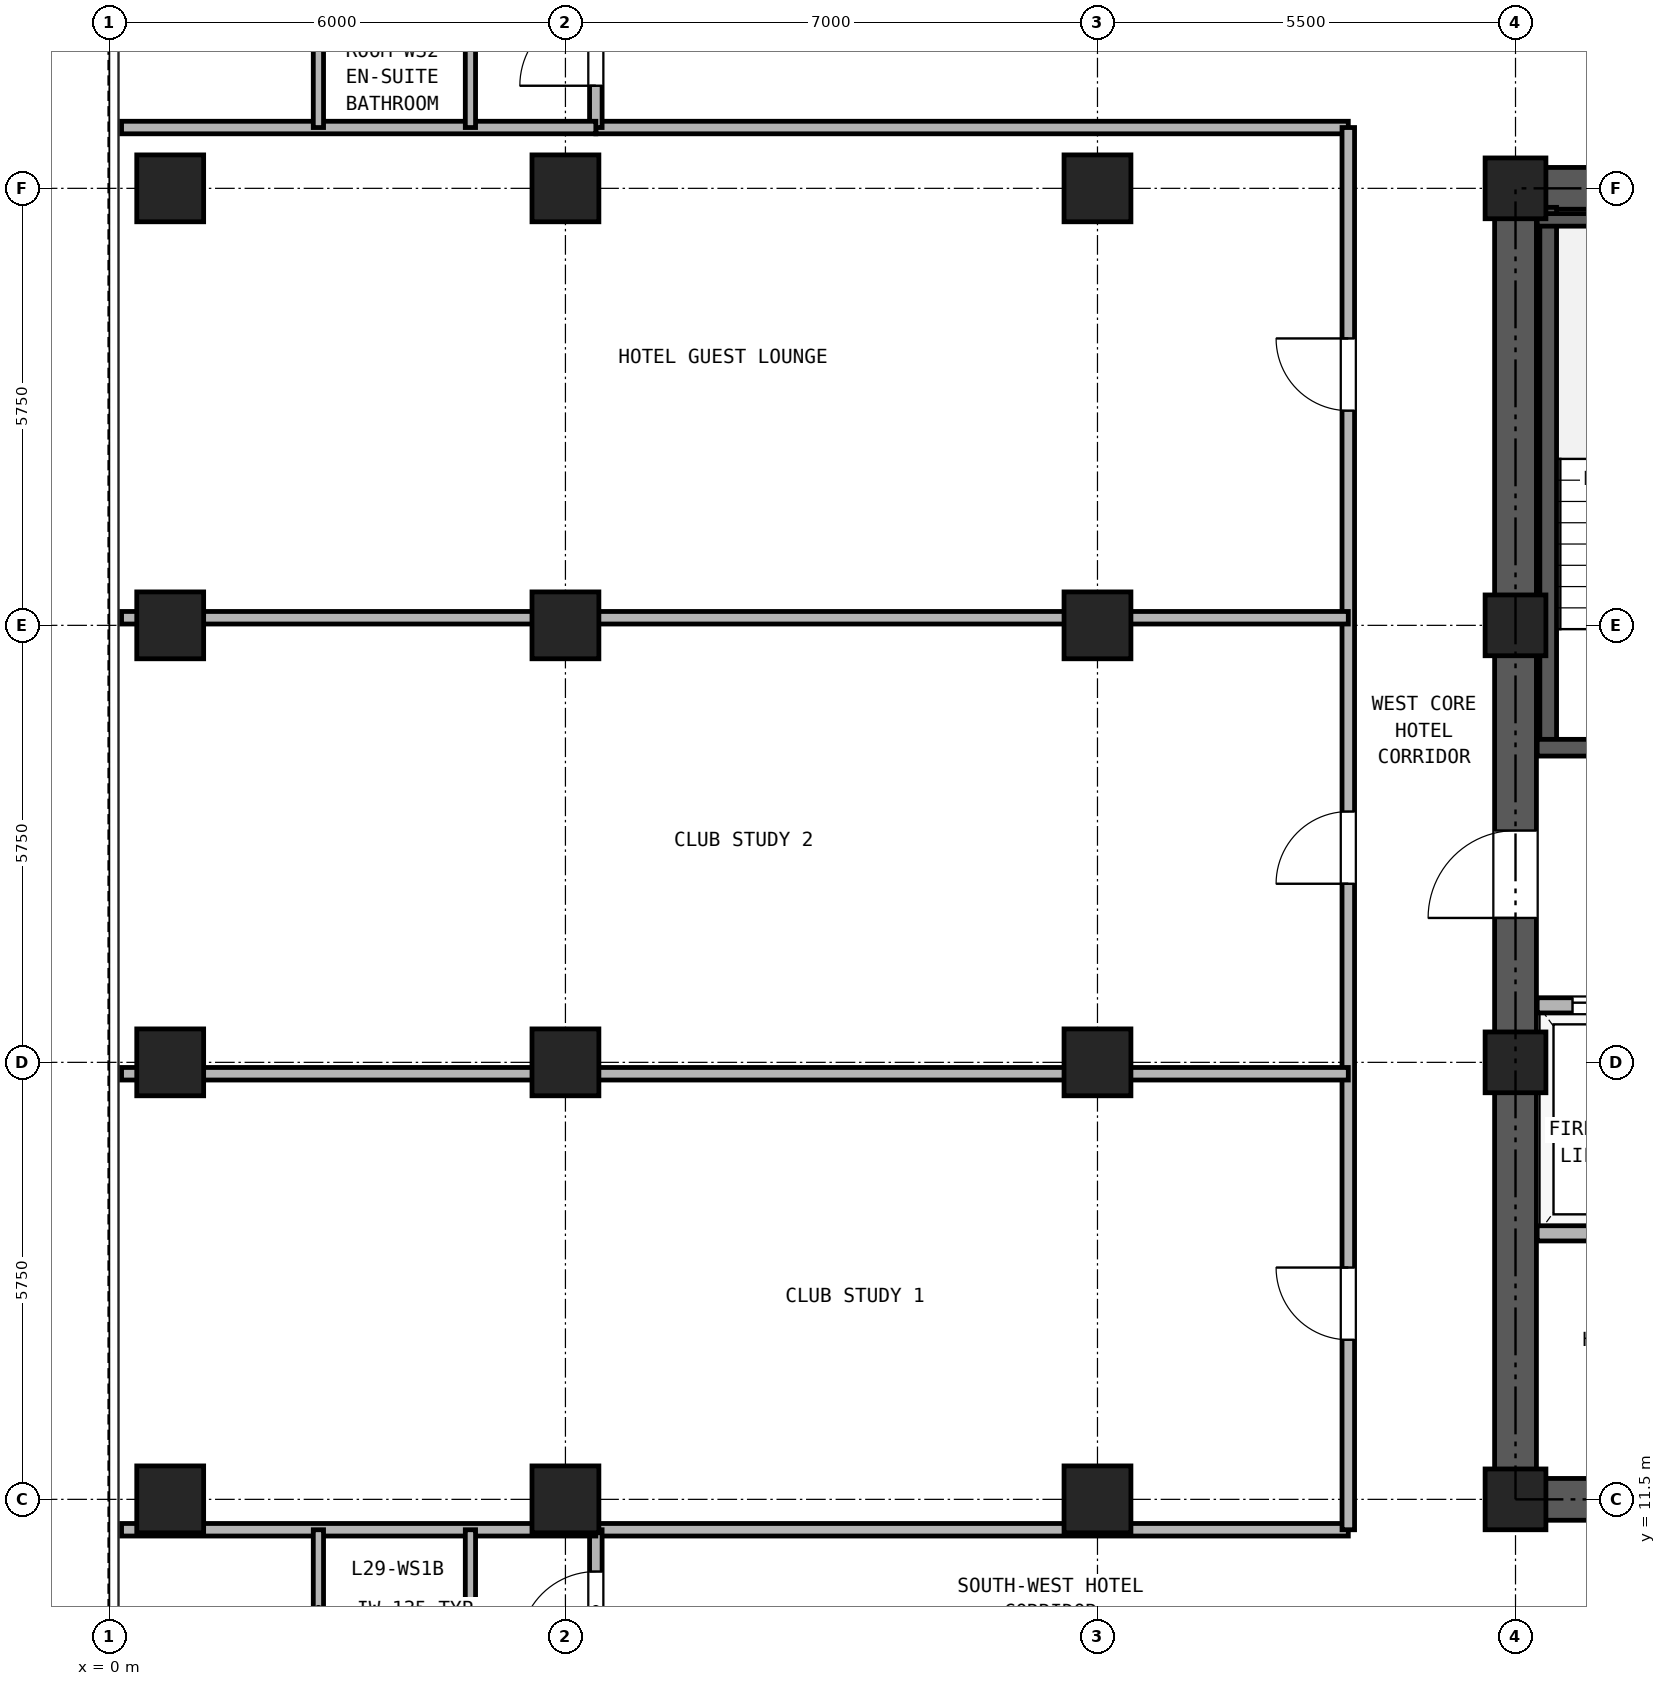
"""IFC4 building model, lengths in metres.
Left out: names, types, materials, properties, quantities, classifications, styles, units other than length and angle.
Written with IfcOpenShell. Run it as: python <this file> out.ifc"""

import sys

from ifc_helpers import new_model, si_unit, direction, frame, frame_2d, origin, origin_2d, place, context, subcontext, project, spatial, rectangle, hollow_rectangle, extrude, source, transform, mapped, element, fill, save


model = new_model("IFC4")
c1 = context("Model", 3, precision=1e-05, world=origin(), true_north=direction((0.0, 1.0)))
c2 = subcontext(c1, "Body", "Model", "MODEL_VIEW")
j1 = project(units=[si_unit("LENGTHUNIT", "METRE"), si_unit("PLANEANGLEUNIT", "RADIAN")], contexts=[c1])
p1 = place(None, origin())
s1 = spatial("IfcSite", under=j1, at=p1, CompositionType="ELEMENT")
p2 = place(p1, origin())
s2 = spatial("IfcBuilding", under=s1, at=p2, CompositionType="ELEMENT")
p3 = place(p2, frame((0.0, 0.0, 108.7)))
s3 = spatial("IfcBuildingStorey", under=s2, at=p3, CompositionType="ELEMENT", Elevation=108.7)
m1 = source(origin(), c2, "Body", "SweptSolid", [
    extrude(hollow_rectangle(XDim=0.88, YDim=0.88, WallThickness=0.05, at=origin_2d()), origin(), (0.0, 0.0, 1.0), 2.95),
])
for number, where, z_axis, x_axis in (
    (1, (0.8, 11.5, 0.0), (0.0, 0.0, 1.0), (1.0, 0.0, 0.0)),
    (2, (0.8, 17.25, 0.0), (0.0, 0.0, 1.0), (1.0, 0.0, 0.0)),
    (3, (0.8, 23.0, 0.0), (0.0, 0.0, 1.0), (1.0, 0.0, 0.0)),
    (4, (0.8, 28.75, 0.0), (0.0, 0.0, 1.0), (1.0, 0.0, 0.0)),
    (5, (6.0, 11.5, 0.0), (0.0, 0.0, 1.0), (1.0, 0.0, 0.0)),
    (6, (6.0, 17.25, 0.0), (0.0, 0.0, 1.0), (1.0, 0.0, 0.0)),
    (7, (6.0, 23.0, 0.0), (0.0, 0.0, 1.0), (1.0, 0.0, 0.0)),
    (8, (6.0, 28.75, 0.0), (0.0, 0.0, 1.0), (1.0, 0.0, 0.0)),
    (9, (13.0, 11.5, 0.0), (0.0, 0.0, 1.0), (1.0, 0.0, 0.0)),
    (10, (13.0, 17.25, 0.0), (0.0, 0.0, 1.0), (1.0, 0.0, 0.0)),
    (11, (13.0, 23.0, 0.0), (0.0, 0.0, 1.0), (1.0, 0.0, 0.0)),
    (12, (13.0, 28.75, 0.0), (0.0, 0.0, 1.0), (1.0, 0.0, 0.0)),
):
    element("IfcColumn", number, at=place(p3, frame(where, z_axis=z_axis, x_axis=x_axis)), inside=s3, PredefinedType="COLUMN", context=c2, shape_type="MappedRepresentation", body=[
        mapped(m1, transform((0.0, 0.0, 0.0), x_axis=(1.0, 0.0, 0.0), y_axis=(0.0, 1.0, 0.0), z_axis=(0.0, 0.0, 1.0), scale=1.0)),
    ])
m2 = source(origin(), c2, "Body", "SweptSolid", [
    extrude(hollow_rectangle(XDim=0.8, YDim=0.8, WallThickness=0.045, at=origin_2d()), origin(), (0.0, 0.0, 1.0), 2.95),
])
for number, where, z_axis, x_axis in (
    (13, (18.5, 11.5, 0.0), (0.0, 0.0, 1.0), (1.0, 0.0, 0.0)),
    (14, (18.5, 17.25, 0.0), (0.0, 0.0, 1.0), (1.0, 0.0, 0.0)),
    (15, (18.5, 23.0, 0.0), (0.0, 0.0, 1.0), (1.0, 0.0, 0.0)),
    (16, (18.5, 28.75, 0.0), (0.0, 0.0, 1.0), (1.0, 0.0, 0.0)),
):
    element("IfcColumn", number, at=place(p3, frame(where, z_axis=z_axis, x_axis=x_axis)), inside=s3, PredefinedType="COLUMN", context=c2, shape_type="MappedRepresentation", body=[
        mapped(m2, transform((0.0, 0.0, 0.0), x_axis=(1.0, 0.0, 0.0), y_axis=(0.0, 1.0, 0.0), z_axis=(0.0, 0.0, 1.0), scale=1.0)),
    ])
p4 = place(p3, frame((18.225, 11.5, 0.0), z_axis=(0.0, 0.0, 1.0), x_axis=(1.0, 0.0, 0.0)))
e17 = element("IfcWall", 17, at=p4, inside=s3, PredefinedType="SHEAR", context=c2, shape_type="SweptSolid", body=[
    extrude(rectangle(XDim=10.55, YDim=0.55, at=frame_2d((5.275, 0.0))), origin(), (0.0, 0.0, 1.0), 2.95),
])
p5 = place(p4, frame((2.375, 0.0, 0.0)))
e18 = element("IfcOpeningElement", 18, at=p5, cuts=e17, PredefinedType="OPENING", context=c2, shape_type="SweptSolid", body=[
    extrude(rectangle(XDim=0.95, YDim=2.15, at=frame_2d((0.475, 1.075))), frame((0.0, 0.285, 0.0), z_axis=(0.0, -1.0, 0.0), x_axis=(1.0, 0.0, 0.0)), (0.0, 0.0, 1.0), 0.57),
])
p6 = place(p4, frame((5.875, 0.0, 0.0)))
e19 = element("IfcOpeningElement", 19, at=p6, cuts=e17, PredefinedType="OPENING", context=c2, shape_type="SweptSolid", body=[
    extrude(rectangle(XDim=1.1, YDim=2.25, at=frame_2d((0.55, 1.125))), frame((0.0, 0.285, 0.0), z_axis=(0.0, -1.0, 0.0), x_axis=(1.0, 0.0, 0.0)), (0.0, 0.0, 1.0), 0.57),
])
p7 = place(p4, frame((8.275, 0.0, 0.0)))
e20 = element("IfcOpeningElement", 20, at=p7, cuts=e17, PredefinedType="OPENING", context=c2, shape_type="SweptSolid", body=[
    extrude(rectangle(XDim=1.1, YDim=2.25, at=frame_2d((0.55, 1.125))), frame((0.0, 0.285, 0.0), z_axis=(0.0, -1.0, 0.0), x_axis=(1.0, 0.0, 0.0)), (0.0, 0.0, 1.0), 0.57),
])
p8 = place(p3, frame((18.225, 28.75, 0.0), z_axis=(0.0, 0.0, 1.0), x_axis=(1.0, 0.0, 0.0)))
e21 = element("IfcWall", 21, at=p8, inside=s3, PredefinedType="SHEAR", context=c2, shape_type="SweptSolid", body=[
    extrude(rectangle(XDim=10.55, YDim=0.55, at=frame_2d((5.275, 0.0))), origin(), (0.0, 0.0, 1.0), 2.95),
])
p9 = place(p8, frame((4.155, 0.0, 0.0)))
e22 = element("IfcOpeningElement", 22, at=p9, cuts=e21, PredefinedType="OPENING", context=c2, shape_type="SweptSolid", body=[
    extrude(rectangle(XDim=0.9, YDim=2.05, at=frame_2d((0.45, 1.025))), frame((0.0, 0.285, 0.0), z_axis=(0.0, -1.0, 0.0), x_axis=(1.0, 0.0, 0.0)), (0.0, 0.0, 1.0), 0.57),
])
p10 = place(p8, frame((5.695, 0.0, 0.0)))
e23 = element("IfcOpeningElement", 23, at=p10, cuts=e21, PredefinedType="OPENING", context=c2, shape_type="SweptSolid", body=[
    extrude(rectangle(XDim=0.9, YDim=2.05, at=frame_2d((0.45, 1.025))), frame((0.0, 0.285, 0.0), z_axis=(0.0, -1.0, 0.0), x_axis=(1.0, 0.0, 0.0)), (0.0, 0.0, 1.0), 0.57),
])
p11 = place(p3, frame((18.5, 11.775, 0.0), z_axis=(0.0, 0.0, 1.0), x_axis=(0.0, 1.0, 0.0)))
e24 = element("IfcWall", 24, at=p11, inside=s3, PredefinedType="SHEAR", context=c2, shape_type="SweptSolid", body=[
    extrude(rectangle(XDim=16.7, YDim=0.55, at=frame_2d((8.35, 0.0))), origin(), (0.0, 0.0, 1.0), 2.95),
])
p12 = place(p11, frame((7.375, 0.0, 0.0)))
e25 = element("IfcOpeningElement", 25, at=p12, cuts=e24, PredefinedType="OPENING", context=c2, shape_type="SweptSolid", body=[
    extrude(rectangle(XDim=1.15, YDim=2.2, at=frame_2d((0.575, 1.1))), frame((0.0, 0.285, 0.0), z_axis=(0.0, -1.0, 0.0), x_axis=(1.0, 0.0, 0.0)), (0.0, 0.0, 1.0), 0.57),
])
p13 = place(p3, frame((18.93, 21.39, 0.0), z_axis=(0.0, 0.0, 1.0), x_axis=(0.0, 1.0, 0.0)))
e26 = element("IfcWall", 26, at=p13, inside=s3, PredefinedType="SOLIDWALL", context=c2, shape_type="SweptSolid", body=[
    extrude(rectangle(XDim=7.11, YDim=0.22, at=frame_2d((3.555, 0.0))), origin(), (0.0, 0.0, 1.0), 2.95),
])
p14 = place(p3, frame((18.785, 28.335, 0.0), z_axis=(0.0, 0.0, 1.0), x_axis=(1.0, 0.0, 0.0)))
e27 = element("IfcWall", 27, at=p14, inside=s3, PredefinedType="PARTITIONING", context=c2, shape_type="SweptSolid", body=[
    extrude(rectangle(XDim=3.325, YDim=0.165, at=frame_2d((1.663, 0.0))), origin(), (0.0, 0.0, 1.0), 2.95),
])
p15 = place(p3, frame((18.785, 21.39, 0.0), z_axis=(0.0, 0.0, 1.0), x_axis=(1.0, 0.0, 0.0)))
e28 = element("IfcWall", 28, at=p15, inside=s3, PredefinedType="SOLIDWALL", context=c2, shape_type="SweptSolid", body=[
    extrude(rectangle(XDim=6.345, YDim=0.22, at=frame_2d((3.172, 0.0))), origin(), (0.0, 0.0, 1.0), 2.95),
])
p16 = place(p15, frame((1.065, 0.0, 0.0)))
e29 = element("IfcOpeningElement", 29, at=p16, cuts=e28, PredefinedType="OPENING", context=c2, shape_type="SweptSolid", body=[
    extrude(rectangle(XDim=1.15, YDim=2.2, at=frame_2d((0.575, 1.1))), frame((0.0, 0.12, 0.0), z_axis=(0.0, -1.0, 0.0), x_axis=(1.0, 0.0, 0.0)), (0.0, 0.0, 1.0), 0.24),
])
p17 = place(p15, frame((4.795, 0.0, 0.0)))
e30 = element("IfcOpeningElement", 30, at=p17, cuts=e28, PredefinedType="OPENING", context=c2, shape_type="SweptSolid", body=[
    extrude(rectangle(XDim=1.1, YDim=2.25, at=frame_2d((0.55, 1.125))), frame((0.0, 0.12, 0.0), z_axis=(0.0, -1.0, 0.0), x_axis=(1.0, 0.0, 0.0)), (0.0, 0.0, 1.0), 0.24),
])
p18 = place(p3, frame((18.785, 18.0, 0.0), z_axis=(0.0, 0.0, 1.0), x_axis=(1.0, 0.0, 0.0)))
e31 = element("IfcWall", 31, at=p18, inside=s3, PredefinedType="PARTITIONING", context=c2, shape_type="SweptSolid", body=[
    extrude(rectangle(XDim=9.43, YDim=0.2, at=frame_2d((4.715, 0.0))), origin(), (0.0, 0.0, 1.0), 2.95),
])
p19 = place(p18, frame((0.465, 0.0, 0.0)))
e32 = element("IfcOpeningElement", 32, at=p19, cuts=e31, PredefinedType="OPENING", context=c2, shape_type="SweptSolid", body=[
    extrude(rectangle(XDim=1.3, YDim=2.3, at=frame_2d((0.65, 1.15))), frame((0.0, 0.11, 0.0), z_axis=(0.0, -1.0, 0.0), x_axis=(1.0, 0.0, 0.0)), (0.0, 0.0, 1.0), 0.22),
])
p20 = place(p18, frame((2.565, 0.0, 0.0)))
e33 = element("IfcOpeningElement", 33, at=p20, cuts=e31, PredefinedType="OPENING", context=c2, shape_type="SweptSolid", body=[
    extrude(rectangle(XDim=1.3, YDim=2.3, at=frame_2d((0.65, 1.15))), frame((0.0, 0.11, 0.0), z_axis=(0.0, -1.0, 0.0), x_axis=(1.0, 0.0, 0.0)), (0.0, 0.0, 1.0), 0.22),
])
p21 = place(p18, frame((4.985, 0.0, 0.0)))
e34 = element("IfcOpeningElement", 34, at=p21, cuts=e31, PredefinedType="OPENING", context=c2, shape_type="SweptSolid", body=[
    extrude(rectangle(XDim=0.9, YDim=2.05, at=frame_2d((0.45, 1.025))), frame((0.0, 0.11, 0.0), z_axis=(0.0, -1.0, 0.0), x_axis=(1.0, 0.0, 0.0)), (0.0, 0.0, 1.0), 0.22),
])
p22 = place(p18, frame((8.115, 0.0, 0.0)))
e35 = element("IfcOpeningElement", 35, at=p22, cuts=e31, PredefinedType="OPENING", context=c2, shape_type="SweptSolid", body=[
    extrude(rectangle(XDim=0.9, YDim=2.05, at=frame_2d((0.45, 1.025))), frame((0.0, 0.11, 0.0), z_axis=(0.0, -1.0, 0.0), x_axis=(1.0, 0.0, 0.0)), (0.0, 0.0, 1.0), 0.22),
])
p23 = place(p3, frame((18.785, 15.0, 0.0), z_axis=(0.0, 0.0, 1.0), x_axis=(1.0, 0.0, 0.0)))
e36 = element("IfcWall", 36, at=p23, inside=s3, PredefinedType="PARTITIONING", context=c2, shape_type="SweptSolid", body=[
    extrude(rectangle(XDim=9.43, YDim=0.2, at=frame_2d((4.715, 0.0))), origin(), (0.0, 0.0, 1.0), 2.95),
])
for number, where, z_axis, x_axis in (
    (37, (6.4, 11.1, 0.0), (0.0, 0.0, 1.0), (1.0, 0.0, 0.0)),
    (38, (6.4, 29.55, 0.0), (0.0, 0.0, 1.0), (1.0, 0.0, 0.0)),
):
    element("IfcWall", number, at=place(p3, frame(where, z_axis=z_axis, x_axis=x_axis)), inside=s3, PredefinedType="PARTITIONING", context=c2, shape_type="SweptSolid", body=[
        extrude(rectangle(XDim=9.9, YDim=0.165, at=frame_2d((4.95, 0.0))), origin(), (0.0, 0.0, 1.0), 2.95),
    ])
p24 = place(p3, frame((16.3, 11.1, 0.0), z_axis=(0.0, 0.0, 1.0), x_axis=(0.0, 1.0, 0.0)))
e39 = element("IfcWall", 39, at=p24, inside=s3, PredefinedType="PARTITIONING", context=c2, shape_type="SweptSolid", body=[
    extrude(rectangle(XDim=18.45, YDim=0.165, at=frame_2d((9.225, 0.0))), origin(), (0.0, 0.0, 1.0), 2.95),
])
p25 = place(p24, frame((2.5, 0.0, 0.0)))
e40 = element("IfcOpeningElement", 40, at=p25, cuts=e39, PredefinedType="OPENING", context=c2, shape_type="SweptSolid", body=[
    extrude(rectangle(XDim=0.95, YDim=2.15, at=frame_2d((0.475, 1.075))), frame((0.0, 0.093, 0.0), z_axis=(0.0, -1.0, 0.0), x_axis=(1.0, 0.0, 0.0)), (0.0, 0.0, 1.0), 0.185),
])
p26 = place(p24, frame((8.5, 0.0, 0.0)))
e41 = element("IfcOpeningElement", 41, at=p26, cuts=e39, PredefinedType="OPENING", context=c2, shape_type="SweptSolid", body=[
    extrude(rectangle(XDim=0.95, YDim=2.15, at=frame_2d((0.475, 1.075))), frame((0.0, 0.093, 0.0), z_axis=(0.0, -1.0, 0.0), x_axis=(1.0, 0.0, 0.0)), (0.0, 0.0, 1.0), 0.185),
])
p27 = place(p24, frame((14.725, 0.0, 0.0)))
e42 = element("IfcOpeningElement", 42, at=p27, cuts=e39, PredefinedType="OPENING", context=c2, shape_type="SweptSolid", body=[
    extrude(rectangle(XDim=0.95, YDim=2.15, at=frame_2d((0.475, 1.075))), frame((0.0, 0.093, 0.0), z_axis=(0.0, -1.0, 0.0), x_axis=(1.0, 0.0, 0.0)), (0.0, 0.0, 1.0), 0.185),
])
p28 = place(p3, frame((6.4, 0.16, 0.0), z_axis=(0.0, 0.0, 1.0), x_axis=(0.0, 1.0, 0.0)))
e43 = element("IfcWall", 43, at=p28, inside=s3, PredefinedType="PARTITIONING", context=c2, shape_type="SweptSolid", body=[
    extrude(rectangle(XDim=10.94, YDim=0.165, at=frame_2d((5.47, 0.0))), origin(), (0.0, 0.0, 1.0), 2.95),
])
p29 = place(p28, frame((9.39, 0.0, 0.0)))
e44 = element("IfcOpeningElement", 44, at=p29, cuts=e43, PredefinedType="OPENING", context=c2, shape_type="SweptSolid", body=[
    extrude(rectangle(XDim=1.0, YDim=2.15, at=frame_2d((0.5, 1.075))), frame((0.0, 0.093, 0.0), z_axis=(0.0, -1.0, 0.0), x_axis=(1.0, 0.0, 0.0)), (0.0, 0.0, 1.0), 0.185),
])
p30 = place(p3, frame((6.4, 29.55, 0.0), z_axis=(0.0, 0.0, 1.0), x_axis=(0.0, 1.0, 0.0)))
e45 = element("IfcWall", 45, at=p30, inside=s3, PredefinedType="PARTITIONING", context=c2, shape_type="SweptSolid", body=[
    extrude(rectangle(XDim=5.59, YDim=0.165, at=frame_2d((2.795, 0.0))), origin(), (0.0, 0.0, 1.0), 2.95),
])
p31 = place(p30, frame((0.55, 0.0, 0.0)))
e46 = element("IfcOpeningElement", 46, at=p31, cuts=e45, PredefinedType="OPENING", context=c2, shape_type="SweptSolid", body=[
    extrude(rectangle(XDim=1.0, YDim=2.15, at=frame_2d((0.5, 1.075))), frame((0.0, 0.093, 0.0), z_axis=(0.0, -1.0, 0.0), x_axis=(1.0, 0.0, 0.0)), (0.0, 0.0, 1.0), 0.185),
])
for number, where, z_axis, x_axis in (
    (47, (0.16, 11.1, 0.0), (0.0, 0.0, 1.0), (1.0, 0.0, 0.0)),
    (48, (0.16, 29.55, 0.0), (0.0, 0.0, 1.0), (1.0, 0.0, 0.0)),
):
    element("IfcWall", number, at=place(p3, frame(where, z_axis=z_axis, x_axis=x_axis)), inside=s3, PredefinedType="PARTITIONING", context=c2, shape_type="SweptSolid", body=[
        extrude(rectangle(XDim=6.24, YDim=0.165, at=frame_2d((3.12, 0.0))), origin(), (0.0, 0.0, 1.0), 2.95),
    ])
for number, where, z_axis, x_axis in (
    (49, (2.75, 9.0, 0.0), (0.0, 0.0, 1.0), (0.0, 1.0, 0.0)),
    (50, (4.75, 9.0, 0.0), (0.0, 0.0, 1.0), (0.0, 1.0, 0.0)),
):
    element("IfcWall", number, at=place(p3, frame(where, z_axis=z_axis, x_axis=x_axis)), inside=s3, PredefinedType="PARTITIONING", context=c2, shape_type="SweptSolid", body=[
        extrude(rectangle(XDim=2.1, YDim=0.135, at=frame_2d((1.05, 0.0))), origin(), (0.0, 0.0, 1.0), 2.95),
    ])
for number, where, z_axis, x_axis in (
    (51, (2.75, 29.55, 0.0), (0.0, 0.0, 1.0), (0.0, 1.0, 0.0)),
    (52, (4.75, 29.55, 0.0), (0.0, 0.0, 1.0), (0.0, 1.0, 0.0)),
):
    element("IfcWall", number, at=place(p3, frame(where, z_axis=z_axis, x_axis=x_axis)), inside=s3, PredefinedType="PARTITIONING", context=c2, shape_type="SweptSolid", body=[
        extrude(rectangle(XDim=2.1, YDim=0.135, at=frame_2d((1.05, 0.0))), origin(), (0.0, 0.0, 1.0), 2.95),
    ])
for number, where, z_axis, x_axis in (
    (53, (0.16, 17.1, 0.0), (0.0, 0.0, 1.0), (1.0, 0.0, 0.0)),
    (54, (0.16, 23.1, 0.0), (0.0, 0.0, 1.0), (1.0, 0.0, 0.0)),
):
    element("IfcWall", number, at=place(p3, frame(where, z_axis=z_axis, x_axis=x_axis)), inside=s3, PredefinedType="PARTITIONING", context=c2, shape_type="SweptSolid", body=[
        extrude(rectangle(XDim=16.14, YDim=0.165, at=frame_2d((8.07, 0.0))), origin(), (0.0, 0.0, 1.0), 2.247),
    ])
p32 = place(p19, origin())
e55 = element("IfcDoor", 55, at=p32, inside=s3, OperationType="DOUBLE_DOOR_SLIDING", PredefinedType="DOOR", context=c2, shape_type="SweptSolid", body=[
    extrude(rectangle(XDim=1.3, YDim=2.3, at=frame_2d((0.65, 1.15))), frame((0.0, 0.025, 0.0), z_axis=(0.0, -1.0, 0.0), x_axis=(1.0, 0.0, 0.0)), (0.0, 0.0, 1.0), 0.05),
])
fill(e32, e55)
p33 = place(p12, frame((1.15, 0.0, 0.0), z_axis=(0.0, 0.0, 1.0), x_axis=(-1.0, 0.0, 0.0)))
e56 = element("IfcDoor", 56, at=p33, inside=s3, OperationType="SINGLE_SWING_LEFT", PredefinedType="DOOR", context=c2, shape_type="SweptSolid", body=[
    extrude(rectangle(XDim=1.15, YDim=2.2, at=frame_2d((0.575, 1.1))), frame((0.0, 0.025, 0.0), z_axis=(0.0, -1.0, 0.0), x_axis=(1.0, 0.0, 0.0)), (0.0, 0.0, 1.0), 0.05),
])
fill(e25, e56)
p34 = place(p29, origin())
e57 = element("IfcDoor", 57, at=p34, inside=s3, OperationType="SINGLE_SWING_LEFT", PredefinedType="DOOR", context=c2, shape_type="SweptSolid", body=[
    extrude(rectangle(XDim=1.0, YDim=2.15, at=frame_2d((0.5, 1.075))), frame((0.0, 0.025, 0.0), z_axis=(0.0, -1.0, 0.0), x_axis=(1.0, 0.0, 0.0)), (0.0, 0.0, 1.0), 0.05),
])
fill(e44, e57)
p35 = place(p31, origin())
e58 = element("IfcDoor", 58, at=p35, inside=s3, OperationType="SINGLE_SWING_LEFT", PredefinedType="DOOR", context=c2, shape_type="SweptSolid", body=[
    extrude(rectangle(XDim=1.0, YDim=2.15, at=frame_2d((0.5, 1.075))), frame((0.0, 0.025, 0.0), z_axis=(0.0, -1.0, 0.0), x_axis=(1.0, 0.0, 0.0)), (0.0, 0.0, 1.0), 0.05),
])
fill(e46, e58)
p36 = place(p25, frame((0.95, 0.0, 0.0), z_axis=(0.0, 0.0, 1.0), x_axis=(-1.0, 0.0, 0.0)))
e59 = element("IfcDoor", 59, at=p36, inside=s3, OperationType="SINGLE_SWING_RIGHT", PredefinedType="DOOR", context=c2, shape_type="SweptSolid", body=[
    extrude(rectangle(XDim=0.95, YDim=2.15, at=frame_2d((0.475, 1.075))), frame((0.0, 0.025, 0.0), z_axis=(0.0, -1.0, 0.0), x_axis=(1.0, 0.0, 0.0)), (0.0, 0.0, 1.0), 0.05),
])
fill(e40, e59)
p37 = place(p26, frame((0.95, 0.0, 0.0), z_axis=(0.0, 0.0, 1.0), x_axis=(-1.0, 0.0, 0.0)))
e60 = element("IfcDoor", 60, at=p37, inside=s3, OperationType="SINGLE_SWING_LEFT", PredefinedType="DOOR", context=c2, shape_type="SweptSolid", body=[
    extrude(rectangle(XDim=0.95, YDim=2.15, at=frame_2d((0.475, 1.075))), frame((0.0, 0.025, 0.0), z_axis=(0.0, -1.0, 0.0), x_axis=(1.0, 0.0, 0.0)), (0.0, 0.0, 1.0), 0.05),
])
fill(e41, e60)
p38 = place(p27, frame((0.95, 0.0, 0.0), z_axis=(0.0, 0.0, 1.0), x_axis=(-1.0, 0.0, 0.0)))
e61 = element("IfcDoor", 61, at=p38, inside=s3, OperationType="SINGLE_SWING_RIGHT", PredefinedType="DOOR", context=c2, shape_type="SweptSolid", body=[
    extrude(rectangle(XDim=0.95, YDim=2.15, at=frame_2d((0.475, 1.075))), frame((0.0, 0.025, 0.0), z_axis=(0.0, -1.0, 0.0), x_axis=(1.0, 0.0, 0.0)), (0.0, 0.0, 1.0), 0.05),
])
fill(e42, e61)
save(model, sys.argv[1])
